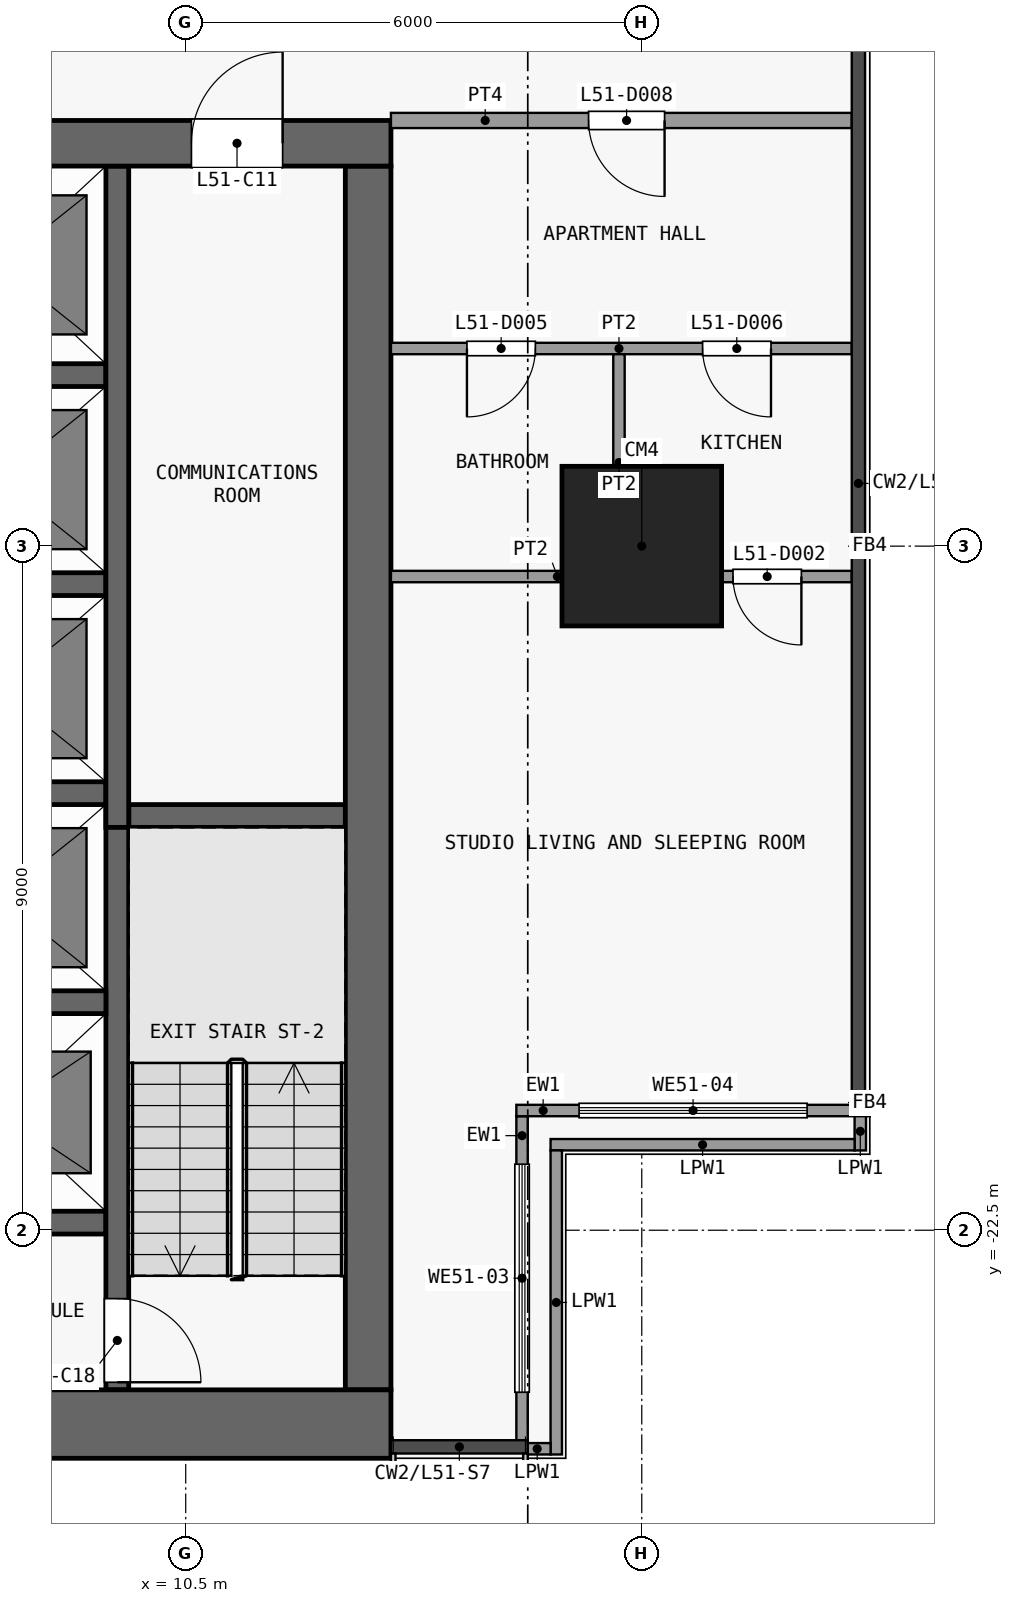
"""IFC4 building model, lengths in metres.
Left out: names, types, materials, properties, quantities, classifications, styles, units other than length and angle.
Written with IfcOpenShell. Run it as: python <this file> out.ifc"""

import sys

from ifc_helpers import new_model, si_unit, direction, frame, frame_2d, origin, origin_2d, place, context, subcontext, project, spatial, rectangle, extrude, element, fill, save


model = new_model("IFC4")
c1 = context("Model", 3, precision=1e-05, world=origin(), true_north=direction((0.0, 1.0)))
c2 = subcontext(c1, "Body", "Model", "MODEL_VIEW")
j1 = project(units=[si_unit("LENGTHUNIT", "METRE"), si_unit("PLANEANGLEUNIT", "RADIAN")], contexts=[c1])
p1 = place(None, origin())
s1 = spatial("IfcSite", under=j1, at=p1, CompositionType="ELEMENT")
p2 = place(p1, origin())
s2 = spatial("IfcBuilding", under=s1, at=p2, CompositionType="ELEMENT")
p3 = place(p2, frame((0.0, 0.0, 205.1)))
s3 = spatial("IfcBuildingStorey", under=s2, at=p3, CompositionType="ELEMENT", Elevation=205.1)
p4 = place(p3, frame((16.5, -13.5, 0.0), z_axis=(0.0, 0.0, 1.0), x_axis=(1.0, 0.0, 0.0)))
e1 = element("IfcColumn", 1, at=p4, inside=s3, PredefinedType="COLUMN", context=c2, shape_type="SweptSolid", body=[
    extrude(rectangle(XDim=2.1, YDim=2.1, at=origin_2d()), origin(), (0.0, 0.0, 1.0), 3.6),
])
p5 = place(p3, frame((-13.2, -25.05, 0.0), z_axis=(0.0, 0.0, 1.0), x_axis=(1.0, 0.0, 0.0)))
e2 = element("IfcWall", 2, at=p5, inside=s3, PredefinedType="SHEAR", context=c2, shape_type="SweptSolid", body=[
    extrude(rectangle(XDim=26.4, YDim=0.9, at=frame_2d((13.2, 0.0))), origin(), (0.0, 0.0, 1.0), 3.3),
])
p6 = place(p3, frame((-13.2, -8.2, 0.0), z_axis=(0.0, 0.0, 1.0), x_axis=(1.0, 0.0, 0.0)))
e3 = element("IfcWall", 3, at=p6, inside=s3, PredefinedType="SHEAR", context=c2, shape_type="SweptSolid", body=[
    extrude(rectangle(XDim=26.4, YDim=0.6, at=frame_2d((13.2, 0.0))), origin(), (0.0, 0.0, 1.0), 3.3),
])
p7 = place(p6, frame((7.5, 0.0, 0.0)))
e4 = element("IfcOpeningElement", 4, at=p7, cuts=e3, PredefinedType="OPENING", context=c2, shape_type="SweptSolid", body=[
    extrude(rectangle(XDim=1.8, YDim=2.1, at=frame_2d((0.9, 1.05))), frame((0.0, 0.31, 0.0), z_axis=(0.0, -1.0, 0.0), x_axis=(1.0, 0.0, 0.0)), (0.0, 0.0, 1.0), 0.62),
])
p8 = place(p6, frame((17.1, 0.0, 0.0)))
e5 = element("IfcOpeningElement", 5, at=p8, cuts=e3, PredefinedType="OPENING", context=c2, shape_type="SweptSolid", body=[
    extrude(rectangle(XDim=1.8, YDim=2.1, at=frame_2d((0.9, 1.05))), frame((0.0, 0.31, 0.0), z_axis=(0.0, -1.0, 0.0), x_axis=(1.0, 0.0, 0.0)), (0.0, 0.0, 1.0), 0.62),
])
p9 = place(p6, frame((2.425, 0.0, 0.0)))
e6 = element("IfcOpeningElement", 6, at=p9, cuts=e3, PredefinedType="OPENING", context=c2, shape_type="SweptSolid", body=[
    extrude(rectangle(XDim=0.9, YDim=2.1, at=frame_2d((0.45, 1.05))), frame((0.0, 0.31, 0.0), z_axis=(0.0, -1.0, 0.0), x_axis=(1.0, 0.0, 0.0)), (0.0, 0.0, 1.0), 0.62),
])
p10 = place(p6, frame((23.775, 0.0, 0.0)))
e7 = element("IfcOpeningElement", 7, at=p10, cuts=e3, PredefinedType="OPENING", context=c2, shape_type="SweptSolid", body=[
    extrude(rectangle(XDim=1.2, YDim=2.1, at=frame_2d((0.6, 1.05))), frame((0.0, 0.31, 0.0), z_axis=(0.0, -1.0, 0.0), x_axis=(1.0, 0.0, 0.0)), (0.0, 0.0, 1.0), 0.62),
])
p11 = place(p3, frame((12.9, -24.6, 0.0), z_axis=(0.0, 0.0, 1.0), x_axis=(0.0, 1.0, 0.0)))
e8 = element("IfcWall", 8, at=p11, inside=s3, PredefinedType="SHEAR", context=c2, shape_type="SweptSolid", body=[
    extrude(rectangle(XDim=16.1, YDim=0.6, at=frame_2d((8.05, 0.0))), origin(), (0.0, 0.0, 1.0), 3.3),
])
for number, where, z_axis, x_axis in (
    (9, (6.65, -22.4, 0.0), (0.0, 0.0, 1.0), (1.0, 0.0, 0.0)),
    (10, (6.65, -19.5, 0.0), (0.0, 0.0, 1.0), (1.0, 0.0, 0.0)),
):
    element("IfcWall", number, at=place(p3, frame(where, z_axis=z_axis, x_axis=x_axis)), inside=s3, PredefinedType="SHEAR", context=c2, shape_type="SweptSolid", body=[
        extrude(rectangle(XDim=2.8, YDim=0.3, at=frame_2d((1.4, 0.0))), origin(), (0.0, 0.0, 1.0), 3.3),
    ])
p12 = place(p3, frame((9.75, -17.05, 0.0), z_axis=(0.0, 0.0, 1.0), x_axis=(1.0, 0.0, 0.0)))
e11 = element("IfcWall", 11, at=p12, inside=s3, PredefinedType="SHEAR", context=c2, shape_type="SweptSolid", body=[
    extrude(rectangle(XDim=2.85, YDim=0.3, at=frame_2d((1.425, 0.0))), origin(), (0.0, 0.0, 1.0), 3.3),
])
for number, where, z_axis, x_axis in (
    (12, (6.65, -16.75, 0.0), (0.0, 0.0, 1.0), (1.0, 0.0, 0.0)),
    (13, (6.65, -14.0, 0.0), (0.0, 0.0, 1.0), (1.0, 0.0, 0.0)),
    (14, (6.65, -11.25, 0.0), (0.0, 0.0, 1.0), (1.0, 0.0, 0.0)),
):
    element("IfcWall", number, at=place(p3, frame(where, z_axis=z_axis, x_axis=x_axis)), inside=s3, PredefinedType="SHEAR", context=c2, shape_type="SweptSolid", body=[
        extrude(rectangle(XDim=2.8, YDim=0.3, at=frame_2d((1.4, 0.0))), origin(), (0.0, 0.0, 1.0), 3.3),
    ])
p13 = place(p3, frame((9.6, -16.9, 0.0), z_axis=(0.0, 0.0, 1.0), x_axis=(0.0, -1.0, 0.0)))
e15 = element("IfcWall", 15, at=p13, inside=s3, PredefinedType="SHEAR", context=c2, shape_type="SweptSolid", body=[
    extrude(rectangle(XDim=7.7, YDim=0.3, at=frame_2d((3.85, 0.0))), origin(), (0.0, 0.0, 1.0), 3.3),
])
p14 = place(p13, frame((6.5, 0.0, 0.0)))
e16 = element("IfcOpeningElement", 16, at=p14, cuts=e15, PredefinedType="OPENING", context=c2, shape_type="SweptSolid", body=[
    extrude(rectangle(XDim=1.1, YDim=2.1, at=frame_2d((0.55, 1.05))), frame((0.0, 0.16, 0.0), z_axis=(0.0, -1.0, 0.0), x_axis=(1.0, 0.0, 0.0)), (0.0, 0.0, 1.0), 0.32),
])
p15 = place(p3, frame((9.6, -17.2, 0.0), z_axis=(0.0, 0.0, 1.0), x_axis=(0.0, 1.0, 0.0)))
e17 = element("IfcWall", 17, at=p15, inside=s3, PredefinedType="SHEAR", context=c2, shape_type="SweptSolid", body=[
    extrude(rectangle(XDim=8.7, YDim=0.3, at=frame_2d((4.35, 0.0))), origin(), (0.0, 0.0, 1.0), 3.3),
])
p16 = place(p3, frame((14.925, -21.0, 0.0), z_axis=(0.0, 0.0, 1.0), x_axis=(0.0, -1.0, 0.0)))
e18 = element("IfcWall", 18, at=p16, inside=s3, PredefinedType="SOLIDWALL", context=c2, shape_type="SweptSolid", body=[
    extrude(rectangle(XDim=4.262, YDim=0.15, at=frame_2d((2.131, 0.0))), origin(), (0.0, 0.0, 1.0), 3.3),
])
p17 = place(p16, frame((0.631, 0.0, 0.9)))
e19 = element("IfcOpeningElement", 19, at=p17, cuts=e18, PredefinedType="OPENING", context=c2, shape_type="SweptSolid", body=[
    extrude(rectangle(XDim=3.0, YDim=2.4, at=frame_2d((1.5, 1.2))), frame((0.0, 0.085, 0.0), z_axis=(0.0, -1.0, 0.0), x_axis=(1.0, 0.0, 0.0)), (0.0, 0.0, 1.0), 0.17),
])
p18 = place(p3, frame((19.5, -20.925, 0.0), z_axis=(0.0, 0.0, 1.0), x_axis=(-1.0, 0.0, 0.0)))
e20 = element("IfcWall", 20, at=p18, inside=s3, PredefinedType="SOLIDWALL", context=c2, shape_type="SweptSolid", body=[
    extrude(rectangle(XDim=4.65, YDim=0.15, at=frame_2d((2.325, 0.0))), origin(), (0.0, 0.0, 1.0), 3.3),
])
p19 = place(p18, frame((0.825, 0.0, 0.9)))
e21 = element("IfcOpeningElement", 21, at=p19, cuts=e20, PredefinedType="OPENING", context=c2, shape_type="SweptSolid", body=[
    extrude(rectangle(XDim=3.0, YDim=2.4, at=frame_2d((1.5, 1.2))), frame((0.0, 0.085, 0.0), z_axis=(0.0, -1.0, 0.0), x_axis=(1.0, 0.0, 0.0)), (0.0, 0.0, 1.0), 0.17),
])
p20 = place(p3, frame((19.375, -20.948, 0.0), z_axis=(0.0, 0.0, 1.0), x_axis=(0.0, -1.0, 0.0)))
e22 = element("IfcWall", 22, at=p20, inside=s3, PredefinedType="PARAPET", context=c2, shape_type="SweptSolid", body=[
    extrude(rectangle(XDim=0.502, YDim=0.15, at=frame_2d((0.251, 0.0))), origin(), (0.0, 0.0, 1.0), 1.15),
])
for number, where, z_axis, x_axis in (
    (23, (19.3, -21.375, 0.0), (0.0, 0.0, 1.0), (-1.0, 0.0, 0.0)),
    (24, (15.375, -21.45, 0.0), (0.0, 0.0, 1.0), (0.0, -1.0, 0.0)),
):
    element("IfcWall", number, at=place(p3, frame(where, z_axis=z_axis, x_axis=x_axis)), inside=s3, PredefinedType="PARAPET", context=c2, shape_type="SweptSolid", body=[
        extrude(rectangle(XDim=4.0, YDim=0.15, at=frame_2d((2.0, 0.0))), origin(), (0.0, 0.0, 1.0), 1.15),
    ])
p21 = place(p3, frame((15.3, -25.375, 0.0), z_axis=(0.0, 0.0, 1.0), x_axis=(-1.0, 0.0, 0.0)))
e25 = element("IfcWall", 25, at=p21, inside=s3, PredefinedType="PARAPET", context=c2, shape_type="SweptSolid", body=[
    extrude(rectangle(XDim=0.353, YDim=0.15, at=frame_2d((0.176, 0.0))), origin(), (0.0, 0.0, 1.0), 1.15),
])
p22 = place(p3, frame((13.2, -13.9, 0.0), z_axis=(0.0, 0.0, 1.0), x_axis=(1.0, 0.0, 0.0)))
e26 = element("IfcWall", 26, at=p22, inside=s3, PredefinedType="PARTITIONING", context=c2, shape_type="SweptSolid", body=[
    extrude(rectangle(XDim=6.062, YDim=0.15, at=frame_2d((3.031, 0.0))), origin(), (0.0, 0.0, 1.0), 3.3),
])
p23 = place(p22, frame((4.5, 0.0, 0.0)))
e27 = element("IfcOpeningElement", 27, at=p23, cuts=e26, PredefinedType="OPENING", context=c2, shape_type="SweptSolid", body=[
    extrude(rectangle(XDim=0.9, YDim=2.1, at=frame_2d((0.45, 1.05))), frame((0.0, 0.085, 0.0), z_axis=(0.0, -1.0, 0.0), x_axis=(1.0, 0.0, 0.0)), (0.0, 0.0, 1.0), 0.17),
])
p24 = place(p3, frame((13.2, -10.9, 0.0), z_axis=(0.0, 0.0, 1.0), x_axis=(1.0, 0.0, 0.0)))
e28 = element("IfcWall", 28, at=p24, inside=s3, PredefinedType="PARTITIONING", context=c2, shape_type="SweptSolid", body=[
    extrude(rectangle(XDim=6.062, YDim=0.15, at=frame_2d((3.031, 0.0))), origin(), (0.0, 0.0, 1.0), 3.3),
])
p25 = place(p24, frame((1.0, 0.0, 0.0)))
e29 = element("IfcOpeningElement", 29, at=p25, cuts=e28, PredefinedType="OPENING", context=c2, shape_type="SweptSolid", body=[
    extrude(rectangle(XDim=0.9, YDim=2.1, at=frame_2d((0.45, 1.05))), frame((0.0, 0.085, 0.0), z_axis=(0.0, -1.0, 0.0), x_axis=(1.0, 0.0, 0.0)), (0.0, 0.0, 1.0), 0.17),
])
p26 = place(p24, frame((4.1, 0.0, 0.0)))
e30 = element("IfcOpeningElement", 30, at=p26, cuts=e28, PredefinedType="OPENING", context=c2, shape_type="SweptSolid", body=[
    extrude(rectangle(XDim=0.9, YDim=2.1, at=frame_2d((0.45, 1.05))), frame((0.0, 0.085, 0.0), z_axis=(0.0, -1.0, 0.0), x_axis=(1.0, 0.0, 0.0)), (0.0, 0.0, 1.0), 0.17),
])
p27 = place(p3, frame((13.2, -7.9, 0.0), z_axis=(0.0, 0.0, 1.0), x_axis=(1.0, 0.0, 0.0)))
e31 = element("IfcWall", 31, at=p27, inside=s3, PredefinedType="PARTITIONING", context=c2, shape_type="SweptSolid", body=[
    extrude(rectangle(XDim=6.062, YDim=0.2, at=frame_2d((3.031, 0.0))), origin(), (0.0, 0.0, 1.0), 3.3),
])
p28 = place(p27, frame((2.6, 0.0, 0.0)))
e32 = element("IfcOpeningElement", 32, at=p28, cuts=e31, PredefinedType="OPENING", context=c2, shape_type="SweptSolid", body=[
    extrude(rectangle(XDim=1.0, YDim=2.1, at=frame_2d((0.5, 1.05))), frame((0.0, 0.11, 0.0), z_axis=(0.0, -1.0, 0.0), x_axis=(1.0, 0.0, 0.0)), (0.0, 0.0, 1.0), 0.22),
])
p29 = place(p3, frame((16.2, -13.825, 0.0), z_axis=(0.0, 0.0, 1.0), x_axis=(0.0, 1.0, 0.0)))
e33 = element("IfcWall", 33, at=p29, inside=s3, PredefinedType="PARTITIONING", context=c2, shape_type="SweptSolid", body=[
    extrude(rectangle(XDim=2.85, YDim=0.15, at=frame_2d((1.425, 0.0))), origin(), (0.0, 0.0, 1.0), 3.3),
])
p30 = place(p10, origin())
e34 = element("IfcDoor", 34, at=p30, inside=s3, OperationType="SINGLE_SWING_RIGHT", PredefinedType="DOOR", context=c2, shape_type="SweptSolid", body=[
    extrude(rectangle(XDim=1.2, YDim=2.1, at=frame_2d((0.6, 1.05))), frame((0.0, 0.025, 0.0), z_axis=(0.0, -1.0, 0.0), x_axis=(1.0, 0.0, 0.0)), (0.0, 0.0, 1.0), 0.05),
])
fill(e7, e34)
p31 = place(p14, origin())
e35 = element("IfcDoor", 35, at=p31, inside=s3, OperationType="SINGLE_SWING_RIGHT", PredefinedType="DOOR", context=c2, shape_type="SweptSolid", body=[
    extrude(rectangle(XDim=1.1, YDim=2.1, at=frame_2d((0.55, 1.05))), frame((0.0, 0.025, 0.0), z_axis=(0.0, -1.0, 0.0), x_axis=(1.0, 0.0, 0.0)), (0.0, 0.0, 1.0), 0.05),
])
fill(e16, e35)
p32 = place(p17, origin())
e36 = element("IfcWindow", 36, at=p32, inside=s3, PartitioningType="SINGLE_PANEL", PredefinedType="WINDOW", context=c2, shape_type="SweptSolid", body=[
    extrude(rectangle(XDim=3.0, YDim=2.4, at=frame_2d((1.5, 1.2))), frame((0.0, 0.03, 0.0), z_axis=(0.0, -1.0, 0.0), x_axis=(1.0, 0.0, 0.0)), (0.0, 0.0, 1.0), 0.06),
])
fill(e19, e36)
p33 = place(p19, origin())
e37 = element("IfcWindow", 37, at=p33, inside=s3, PartitioningType="SINGLE_PANEL", PredefinedType="WINDOW", context=c2, shape_type="SweptSolid", body=[
    extrude(rectangle(XDim=3.0, YDim=2.4, at=frame_2d((1.5, 1.2))), frame((0.0, 0.03, 0.0), z_axis=(0.0, -1.0, 0.0), x_axis=(1.0, 0.0, 0.0)), (0.0, 0.0, 1.0), 0.06),
])
fill(e21, e37)
p34 = place(p23, origin())
e38 = element("IfcDoor", 38, at=p34, inside=s3, OperationType="SINGLE_SWING_RIGHT", PredefinedType="DOOR", context=c2, shape_type="SweptSolid", body=[
    extrude(rectangle(XDim=0.9, YDim=2.1, at=frame_2d((0.45, 1.05))), frame((0.0, 0.025, 0.0), z_axis=(0.0, -1.0, 0.0), x_axis=(1.0, 0.0, 0.0)), (0.0, 0.0, 1.0), 0.05),
])
fill(e27, e38)
p35 = place(p25, origin())
e39 = element("IfcDoor", 39, at=p35, inside=s3, OperationType="SINGLE_SWING_LEFT", PredefinedType="DOOR", context=c2, shape_type="SweptSolid", body=[
    extrude(rectangle(XDim=0.9, YDim=2.1, at=frame_2d((0.45, 1.05))), frame((0.0, 0.025, 0.0), z_axis=(0.0, -1.0, 0.0), x_axis=(1.0, 0.0, 0.0)), (0.0, 0.0, 1.0), 0.05),
])
fill(e29, e39)
p36 = place(p26, origin())
e40 = element("IfcDoor", 40, at=p36, inside=s3, OperationType="SINGLE_SWING_RIGHT", PredefinedType="DOOR", context=c2, shape_type="SweptSolid", body=[
    extrude(rectangle(XDim=0.9, YDim=2.1, at=frame_2d((0.45, 1.05))), frame((0.0, 0.025, 0.0), z_axis=(0.0, -1.0, 0.0), x_axis=(1.0, 0.0, 0.0)), (0.0, 0.0, 1.0), 0.05),
])
fill(e30, e40)
p37 = place(p28, origin())
e41 = element("IfcDoor", 41, at=p37, inside=s3, OperationType="SINGLE_SWING_RIGHT", PredefinedType="DOOR", context=c2, shape_type="SweptSolid", body=[
    extrude(rectangle(XDim=1.0, YDim=2.1, at=frame_2d((0.5, 1.05))), frame((0.0, 0.025, 0.0), z_axis=(0.0, -1.0, 0.0), x_axis=(1.0, 0.0, 0.0)), (0.0, 0.0, 1.0), 0.05),
])
fill(e32, e41)
save(model, sys.argv[1])
